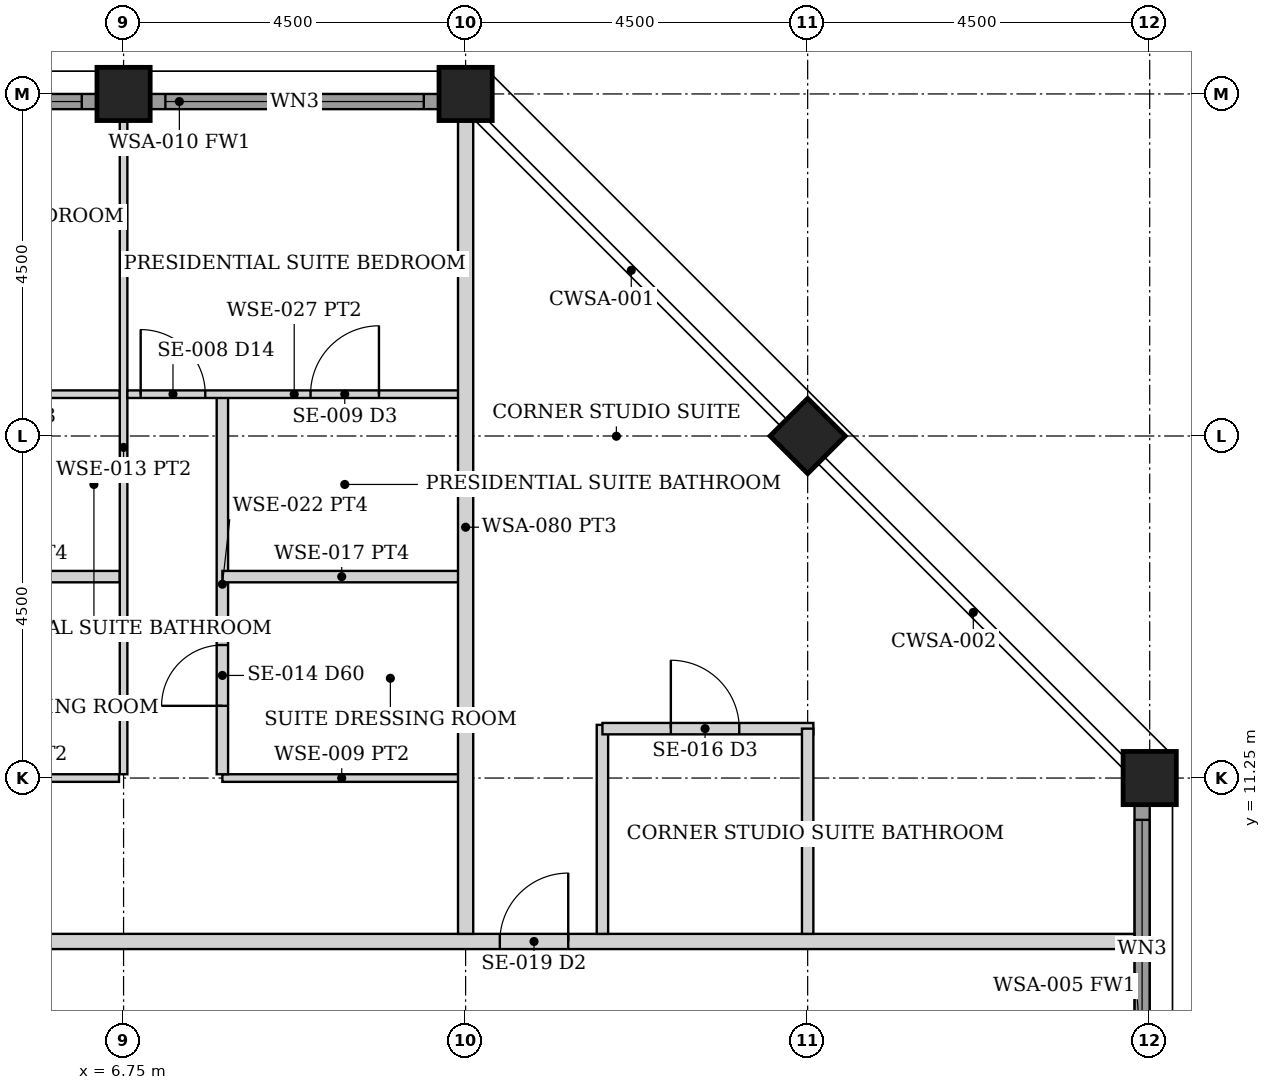
"""IFC4 building model, lengths in metres.
Left out: names, types, materials, properties, quantities, classifications, styles, units other than length and angle.
Written with IfcOpenShell. Run it as: python <this file> out.ifc"""

import sys

from ifc_helpers import new_model, si_unit, direction, frame, frame_2d, origin, origin_2d, place, context, subcontext, project, spatial, rectangle, hollow_rectangle, extrude, element, fill, save


model = new_model("IFC4")
c1 = context("Model", 3, precision=1e-05, world=origin(), true_north=direction((0.0, 1.0)))
c2 = subcontext(c1, "Body", "Model", "MODEL_VIEW")
j1 = project(units=[si_unit("LENGTHUNIT", "METRE"), si_unit("PLANEANGLEUNIT", "RADIAN")], contexts=[c1])
p1 = place(None, origin())
s1 = spatial("IfcSite", under=j1, at=p1, CompositionType="ELEMENT")
p2 = place(p1, origin())
s2 = spatial("IfcBuilding", under=s1, at=p2, CompositionType="ELEMENT")
p3 = place(p2, frame((0.0, 0.0, 245.8)))
s3 = spatial("IfcBuildingStorey", under=s2, at=p3, CompositionType="ELEMENT", Elevation=245.8)
for number, where, z_axis, x_axis in (
    (1, (6.75, 20.25, 0.0), (0.0, 0.0, 1.0), (0.0, 1.0, 0.0)),
    (2, (11.25, 20.25, 0.0), (0.0, 0.0, 1.0), (0.0, 1.0, 0.0)),
    (3, (20.25, 11.25, 0.0), (0.0, 0.0, 1.0), (1.0, 0.0, 0.0)),
    (4, (15.75, 15.75, 0.0), (0.0, 0.0, 1.0), (0.707, 0.707, 0.0)),
):
    element("IfcColumn", number, at=place(p3, frame(where, z_axis=z_axis, x_axis=x_axis)), inside=s3, PredefinedType="COLUMN", context=c2, shape_type="SweptSolid", body=[
        extrude(hollow_rectangle(XDim=0.7, YDim=0.7, WallThickness=0.035, at=origin_2d()), origin(), (0.0, 0.0, 1.0), 3.75),
    ])
p4 = place(p3, frame((20.15, 7.105, 0.0), z_axis=(0.0, 0.0, 1.0), x_axis=(0.0, 1.0, 0.0)))
e5 = element("IfcWall", 5, at=p4, inside=s3, PredefinedType="SOLIDWALL", context=c2, shape_type="SweptSolid", body=[
    extrude(rectangle(XDim=3.79, YDim=0.2, at=frame_2d((1.895, 0.0))), origin(), (0.0, 0.0, 1.0), 2.629),
])
p5 = place(p4, frame((0.195, 0.0, 0.3)))
e6 = element("IfcOpeningElement", 6, at=p5, cuts=e5, PredefinedType="OPENING", context=c2, shape_type="SweptSolid", body=[
    extrude(rectangle(XDim=3.4, YDim=2.179, at=frame_2d((1.7, 1.089))), frame((0.0, 0.11, 0.0), z_axis=(0.0, -1.0, 0.0), x_axis=(1.0, 0.0, 0.0)), (0.0, 0.0, 1.0), 0.22),
])
p6 = place(p3, frame((2.605, 20.15, 0.0), z_axis=(0.0, 0.0, 1.0), x_axis=(1.0, 0.0, 0.0)))
e7 = element("IfcWall", 7, at=p6, inside=s3, PredefinedType="SOLIDWALL", context=c2, shape_type="SweptSolid", body=[
    extrude(rectangle(XDim=3.79, YDim=0.2, at=frame_2d((1.895, 0.0))), origin(), (0.0, 0.0, 1.0), 2.629),
])
p7 = place(p6, frame((0.195, 0.0, 0.3)))
e8 = element("IfcOpeningElement", 8, at=p7, cuts=e7, PredefinedType="OPENING", context=c2, shape_type="SweptSolid", body=[
    extrude(rectangle(XDim=3.4, YDim=2.179, at=frame_2d((1.7, 1.089))), frame((0.0, 0.11, 0.0), z_axis=(0.0, -1.0, 0.0), x_axis=(1.0, 0.0, 0.0)), (0.0, 0.0, 1.0), 0.22),
])
p8 = place(p3, frame((7.105, 20.15, 0.0), z_axis=(0.0, 0.0, 1.0), x_axis=(1.0, 0.0, 0.0)))
e9 = element("IfcWall", 9, at=p8, inside=s3, PredefinedType="SOLIDWALL", context=c2, shape_type="SweptSolid", body=[
    extrude(rectangle(XDim=3.79, YDim=0.2, at=frame_2d((1.895, 0.0))), origin(), (0.0, 0.0, 1.0), 2.629),
])
p9 = place(p8, frame((0.195, 0.0, 0.3)))
e10 = element("IfcOpeningElement", 10, at=p9, cuts=e9, PredefinedType="OPENING", context=c2, shape_type="SweptSolid", body=[
    extrude(rectangle(XDim=3.4, YDim=2.179, at=frame_2d((1.7, 1.089))), frame((0.0, 0.11, 0.0), z_axis=(0.0, -1.0, 0.0), x_axis=(1.0, 0.0, 0.0)), (0.0, 0.0, 1.0), 0.22),
])
p10 = place(p3, frame((-20.05, 9.1, 0.0), z_axis=(0.0, 0.0, 1.0), x_axis=(1.0, 0.0, 0.0)))
e11 = element("IfcWall", 11, at=p10, inside=s3, PredefinedType="PARTITIONING", context=c2, shape_type="SweptSolid", body=[
    extrude(rectangle(XDim=40.1, YDim=0.2, at=frame_2d((20.05, 0.0))), origin(), (0.0, 0.0, 1.0), 2.629),
])
p11 = place(p10, frame((9.1, 0.0, 0.0)))
e12 = element("IfcOpeningElement", 12, at=p11, cuts=e11, PredefinedType="OPENING", context=c2, shape_type="SweptSolid", body=[
    extrude(rectangle(XDim=0.9, YDim=2.1, at=frame_2d((0.45, 1.05))), frame((0.0, 0.11, 0.0), z_axis=(0.0, -1.0, 0.0), x_axis=(1.0, 0.0, 0.0)), (0.0, 0.0, 1.0), 0.22),
])
p12 = place(p10, frame((31.75, 0.0, 0.0)))
e13 = element("IfcOpeningElement", 13, at=p12, cuts=e11, PredefinedType="OPENING", context=c2, shape_type="SweptSolid", body=[
    extrude(rectangle(XDim=0.9, YDim=2.1, at=frame_2d((0.45, 1.05))), frame((0.0, 0.11, 0.0), z_axis=(0.0, -1.0, 0.0), x_axis=(1.0, 0.0, 0.0)), (0.0, 0.0, 1.0), 0.22),
])
p13 = place(p10, frame((7.45, 0.0, 0.0)))
e14 = element("IfcOpeningElement", 14, at=p13, cuts=e11, PredefinedType="OPENING", context=c2, shape_type="SweptSolid", body=[
    extrude(rectangle(XDim=0.9, YDim=2.1, at=frame_2d((0.45, 1.05))), frame((0.0, 0.11, 0.0), z_axis=(0.0, -1.0, 0.0), x_axis=(1.0, 0.0, 0.0)), (0.0, 0.0, 1.0), 0.22),
])
p14 = place(p3, frame((3.55, 11.25, 0.0), z_axis=(0.0, 0.0, 1.0), x_axis=(1.0, 0.0, 0.0)))
e15 = element("IfcWall", 15, at=p14, inside=s3, PredefinedType="PARTITIONING", context=c2, shape_type="SweptSolid", body=[
    extrude(rectangle(XDim=3.14, YDim=0.1, at=frame_2d((1.57, 0.0))), origin(), (0.0, 0.0, 1.0), 2.629),
])
p15 = place(p3, frame((2.3, 16.3, 0.0), z_axis=(0.0, 0.0, 1.0), x_axis=(1.0, 0.0, 0.0)))
e16 = element("IfcWall", 16, at=p15, inside=s3, PredefinedType="PARTITIONING", context=c2, shape_type="SweptSolid", body=[
    extrude(rectangle(XDim=4.4, YDim=0.1, at=frame_2d((2.2, 0.0))), origin(), (0.0, 0.0, 1.0), 2.629),
])
p16 = place(p15, frame((0.175, 0.0, 0.0)))
e17 = element("IfcOpeningElement", 17, at=p16, cuts=e16, PredefinedType="OPENING", context=c2, shape_type="SweptSolid", body=[
    extrude(rectangle(XDim=0.85, YDim=2.1, at=frame_2d((0.425, 1.05))), frame((0.0, 0.06, 0.0), z_axis=(0.0, -1.0, 0.0), x_axis=(1.0, 0.0, 0.0)), (0.0, 0.0, 1.0), 0.12),
])
p17 = place(p15, frame((2.41, 0.0, 0.0)))
e18 = element("IfcOpeningElement", 18, at=p17, cuts=e16, PredefinedType="OPENING", context=c2, shape_type="SweptSolid", body=[
    extrude(rectangle(XDim=0.9, YDim=2.1, at=frame_2d((0.45, 1.05))), frame((0.0, 0.06, 0.0), z_axis=(0.0, -1.0, 0.0), x_axis=(1.0, 0.0, 0.0)), (0.0, 0.0, 1.0), 0.12),
])
p18 = place(p3, frame((3.55, 13.9, 0.0), z_axis=(0.0, 0.0, 1.0), x_axis=(1.0, 0.0, 0.0)))
e19 = element("IfcWall", 19, at=p18, inside=s3, PredefinedType="PARTITIONING", context=c2, shape_type="SweptSolid", body=[
    extrude(rectangle(XDim=3.15, YDim=0.15, at=frame_2d((1.575, 0.0))), origin(), (0.0, 0.0, 1.0), 2.629),
])
p19 = place(p3, frame((6.75, 11.3, 0.0), z_axis=(0.0, 0.0, 1.0), x_axis=(0.0, 1.0, 0.0)))
e20 = element("IfcWall", 20, at=p19, inside=s3, PredefinedType="PARTITIONING", context=c2, shape_type="SweptSolid", body=[
    extrude(rectangle(XDim=8.6, YDim=0.1, at=frame_2d((4.3, 0.0))), origin(), (0.0, 0.0, 1.0), 2.629),
])
p20 = place(p3, frame((8.05, 11.25, 0.0), z_axis=(0.0, 0.0, 1.0), x_axis=(1.0, 0.0, 0.0)))
e21 = element("IfcWall", 21, at=p20, inside=s3, PredefinedType="PARTITIONING", context=c2, shape_type="SweptSolid", body=[
    extrude(rectangle(XDim=3.14, YDim=0.1, at=frame_2d((1.57, 0.0))), origin(), (0.0, 0.0, 1.0), 2.629),
])
p21 = place(p3, frame((8.05, 11.3, 0.0), z_axis=(0.0, 0.0, 1.0), x_axis=(0.0, 1.0, 0.0)))
e22 = element("IfcWall", 22, at=p21, inside=s3, PredefinedType="PARTITIONING", context=c2, shape_type="SweptSolid", body=[
    extrude(rectangle(XDim=5.0, YDim=0.15, at=frame_2d((2.5, 0.0))), origin(), (0.0, 0.0, 1.0), 2.629),
])
p22 = place(p21, frame((0.9, 0.0, 0.0)))
e23 = element("IfcOpeningElement", 23, at=p22, cuts=e22, PredefinedType="OPENING", context=c2, shape_type="SweptSolid", body=[
    extrude(rectangle(XDim=0.8, YDim=2.1, at=frame_2d((0.4, 1.05))), frame((0.0, 0.085, 0.0), z_axis=(0.0, -1.0, 0.0), x_axis=(1.0, 0.0, 0.0)), (0.0, 0.0, 1.0), 0.17),
])
p23 = place(p3, frame((6.8, 16.3, 0.0), z_axis=(0.0, 0.0, 1.0), x_axis=(1.0, 0.0, 0.0)))
e24 = element("IfcWall", 24, at=p23, inside=s3, PredefinedType="PARTITIONING", context=c2, shape_type="SweptSolid", body=[
    extrude(rectangle(XDim=4.39, YDim=0.1, at=frame_2d((2.195, 0.0))), origin(), (0.0, 0.0, 1.0), 2.629),
])
p24 = place(p23, frame((0.175, 0.0, 0.0)))
e25 = element("IfcOpeningElement", 25, at=p24, cuts=e24, PredefinedType="OPENING", context=c2, shape_type="SweptSolid", body=[
    extrude(rectangle(XDim=0.85, YDim=2.1, at=frame_2d((0.425, 1.05))), frame((0.0, 0.06, 0.0), z_axis=(0.0, -1.0, 0.0), x_axis=(1.0, 0.0, 0.0)), (0.0, 0.0, 1.0), 0.12),
])
p25 = place(p23, frame((2.41, 0.0, 0.0)))
e26 = element("IfcOpeningElement", 26, at=p25, cuts=e24, PredefinedType="OPENING", context=c2, shape_type="SweptSolid", body=[
    extrude(rectangle(XDim=0.9, YDim=2.1, at=frame_2d((0.45, 1.05))), frame((0.0, 0.06, 0.0), z_axis=(0.0, -1.0, 0.0), x_axis=(1.0, 0.0, 0.0)), (0.0, 0.0, 1.0), 0.12),
])
p26 = place(p3, frame((8.05, 13.9, 0.0), z_axis=(0.0, 0.0, 1.0), x_axis=(1.0, 0.0, 0.0)))
e27 = element("IfcWall", 27, at=p26, inside=s3, PredefinedType="PARTITIONING", context=c2, shape_type="SweptSolid", body=[
    extrude(rectangle(XDim=3.14, YDim=0.15, at=frame_2d((1.57, 0.0))), origin(), (0.0, 0.0, 1.0), 2.629),
])
p27 = place(p3, frame((11.25, 9.2, 0.0), z_axis=(0.0, 0.0, 1.0), x_axis=(0.0, 1.0, 0.0)))
e28 = element("IfcWall", 28, at=p27, inside=s3, PredefinedType="PARTITIONING", context=c2, shape_type="SweptSolid", body=[
    extrude(rectangle(XDim=10.7, YDim=0.2, at=frame_2d((5.35, 0.0))), origin(), (0.0, 0.0, 1.0), 2.629),
])
p28 = place(p3, frame((13.05, 9.2, 0.0), z_axis=(0.0, 0.0, 1.0), x_axis=(0.0, 1.0, 0.0)))
e29 = element("IfcWall", 29, at=p28, inside=s3, PredefinedType="PARTITIONING", context=c2, shape_type="SweptSolid", body=[
    extrude(rectangle(XDim=2.75, YDim=0.15, at=frame_2d((1.375, 0.0))), origin(), (0.0, 0.0, 1.0), 2.629),
])
p29 = place(p3, frame((13.05, 11.9, 0.0), z_axis=(0.0, 0.0, 1.0), x_axis=(1.0, 0.0, 0.0)))
e30 = element("IfcWall", 30, at=p29, inside=s3, PredefinedType="PARTITIONING", context=c2, shape_type="SweptSolid", body=[
    extrude(rectangle(XDim=2.775, YDim=0.15, at=frame_2d((1.387, 0.0))), origin(), (0.0, 0.0, 1.0), 2.629),
])
p30 = place(p29, frame((0.9, 0.0, 0.0)))
e31 = element("IfcOpeningElement", 31, at=p30, cuts=e30, PredefinedType="OPENING", context=c2, shape_type="SweptSolid", body=[
    extrude(rectangle(XDim=0.9, YDim=2.1, at=frame_2d((0.45, 1.05))), frame((0.0, 0.085, 0.0), z_axis=(0.0, -1.0, 0.0), x_axis=(1.0, 0.0, 0.0)), (0.0, 0.0, 1.0), 0.17),
])
p31 = place(p3, frame((15.75, 9.2, 0.0), z_axis=(0.0, 0.0, 1.0), x_axis=(0.0, 1.0, 0.0)))
e32 = element("IfcWall", 32, at=p31, inside=s3, PredefinedType="PARTITIONING", context=c2, shape_type="SweptSolid", body=[
    extrude(rectangle(XDim=2.7, YDim=0.15, at=frame_2d((1.35, 0.0))), origin(), (0.0, 0.0, 1.0), 2.629),
])
p32 = place(p5, origin())
e33 = element("IfcWindow", 33, at=p32, inside=s3, PartitioningType="SINGLE_PANEL", PredefinedType="WINDOW", context=c2, shape_type="SweptSolid", body=[
    extrude(rectangle(XDim=3.4, YDim=2.179, at=frame_2d((1.7, 1.089))), frame((0.0, 0.03, 0.0), z_axis=(0.0, -1.0, 0.0), x_axis=(1.0, 0.0, 0.0)), (0.0, 0.0, 1.0), 0.06),
])
fill(e6, e33)
p33 = place(p7, origin())
e34 = element("IfcWindow", 34, at=p33, inside=s3, PartitioningType="SINGLE_PANEL", PredefinedType="WINDOW", context=c2, shape_type="SweptSolid", body=[
    extrude(rectangle(XDim=3.4, YDim=2.179, at=frame_2d((1.7, 1.089))), frame((0.0, 0.03, 0.0), z_axis=(0.0, -1.0, 0.0), x_axis=(1.0, 0.0, 0.0)), (0.0, 0.0, 1.0), 0.06),
])
fill(e8, e34)
p34 = place(p9, origin())
e35 = element("IfcWindow", 35, at=p34, inside=s3, PartitioningType="SINGLE_PANEL", PredefinedType="WINDOW", context=c2, shape_type="SweptSolid", body=[
    extrude(rectangle(XDim=3.4, YDim=2.179, at=frame_2d((1.7, 1.089))), frame((0.0, 0.03, 0.0), z_axis=(0.0, -1.0, 0.0), x_axis=(1.0, 0.0, 0.0)), (0.0, 0.0, 1.0), 0.06),
])
fill(e10, e35)
p35 = place(p24, origin())
e36 = element("IfcDoor", 36, at=p35, inside=s3, OperationType="SINGLE_SWING_LEFT", PredefinedType="DOOR", context=c2, shape_type="SweptSolid", body=[
    extrude(rectangle(XDim=0.85, YDim=2.1, at=frame_2d((0.425, 1.05))), frame((0.0, 0.025, 0.0), z_axis=(0.0, -1.0, 0.0), x_axis=(1.0, 0.0, 0.0)), (0.0, 0.0, 1.0), 0.05),
])
fill(e25, e36)
p36 = place(p22, origin())
e37 = element("IfcDoor", 37, at=p36, inside=s3, OperationType="SINGLE_SWING_LEFT", PredefinedType="DOOR", context=c2, shape_type="SweptSolid", body=[
    extrude(rectangle(XDim=0.8, YDim=2.1, at=frame_2d((0.4, 1.05))), frame((0.0, 0.025, 0.0), z_axis=(0.0, -1.0, 0.0), x_axis=(1.0, 0.0, 0.0)), (0.0, 0.0, 1.0), 0.05),
])
fill(e23, e37)
p37 = place(p25, origin())
e38 = element("IfcDoor", 38, at=p37, inside=s3, OperationType="SINGLE_SWING_RIGHT", PredefinedType="DOOR", context=c2, shape_type="SweptSolid", body=[
    extrude(rectangle(XDim=0.9, YDim=2.1, at=frame_2d((0.45, 1.05))), frame((0.0, 0.025, 0.0), z_axis=(0.0, -1.0, 0.0), x_axis=(1.0, 0.0, 0.0)), (0.0, 0.0, 1.0), 0.05),
])
fill(e26, e38)
p38 = place(p12, origin())
e39 = element("IfcDoor", 39, at=p38, inside=s3, OperationType="SINGLE_SWING_RIGHT", PredefinedType="DOOR", context=c2, shape_type="SweptSolid", body=[
    extrude(rectangle(XDim=0.9, YDim=2.1, at=frame_2d((0.45, 1.05))), frame((0.0, 0.025, 0.0), z_axis=(0.0, -1.0, 0.0), x_axis=(1.0, 0.0, 0.0)), (0.0, 0.0, 1.0), 0.05),
])
fill(e13, e39)
p39 = place(p30, origin())
e40 = element("IfcDoor", 40, at=p39, inside=s3, OperationType="SINGLE_SWING_LEFT", PredefinedType="DOOR", context=c2, shape_type="SweptSolid", body=[
    extrude(rectangle(XDim=0.9, YDim=2.1, at=frame_2d((0.45, 1.05))), frame((0.0, 0.025, 0.0), z_axis=(0.0, -1.0, 0.0), x_axis=(1.0, 0.0, 0.0)), (0.0, 0.0, 1.0), 0.05),
])
fill(e31, e40)
save(model, sys.argv[1])
